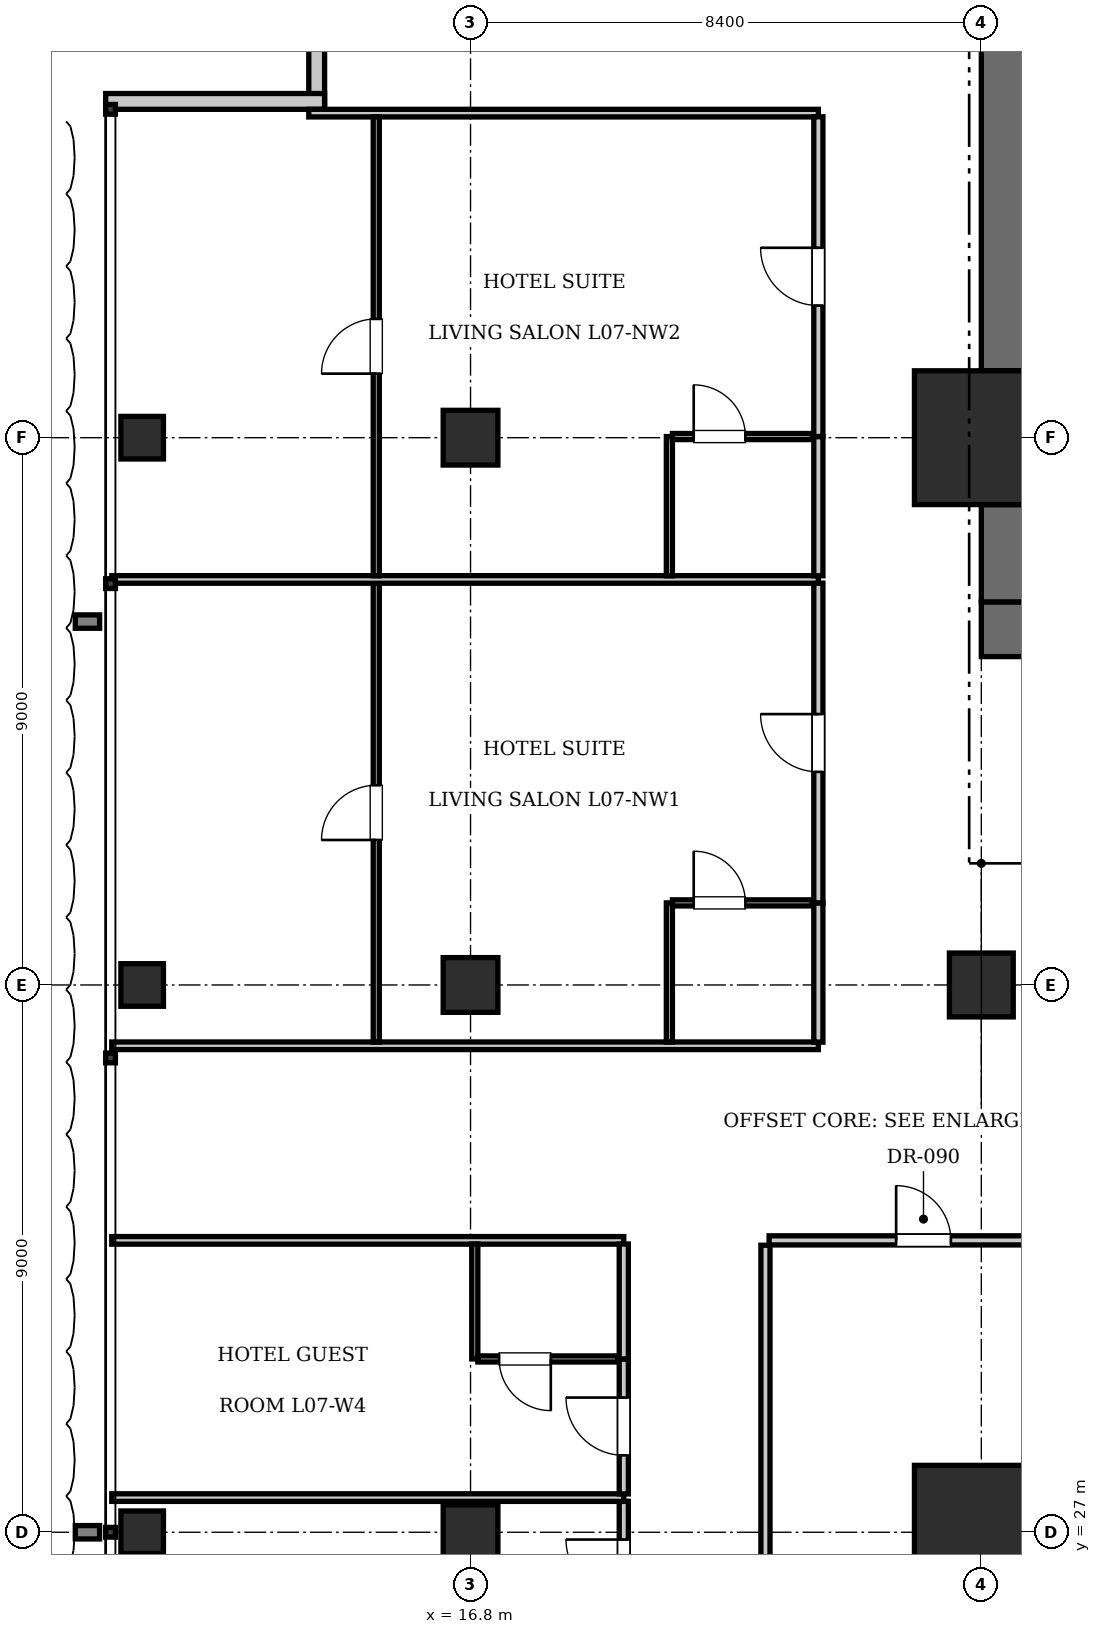
"""IFC4 building model, lengths in metres.
Left out: names, types, materials, properties, quantities, classifications, styles, units other than length and angle.
Written with IfcOpenShell. Run it as: python <this file> out.ifc"""

import sys

from ifc_helpers import new_model, si_unit, direction, frame, frame_2d, origin, origin_2d, place, context, subcontext, project, spatial, rectangle, i_section, extrude, element, fill, save


model = new_model("IFC4")
c1 = context("Model", 3, precision=1e-05, world=origin(), true_north=direction((0.0, 1.0)))
c2 = subcontext(c1, "Body", "Model", "MODEL_VIEW")
j1 = project(units=[si_unit("LENGTHUNIT", "METRE"), si_unit("PLANEANGLEUNIT", "RADIAN")], contexts=[c1])
p1 = place(None, origin())
s1 = spatial("IfcSite", under=j1, at=p1, CompositionType="ELEMENT")
p2 = place(p1, origin())
s2 = spatial("IfcBuilding", under=s1, at=p2, CompositionType="ELEMENT")
p3 = place(p2, frame((0.0, 0.0, 34.65)))
s3 = spatial("IfcBuildingStorey", under=s2, at=p3, CompositionType="ELEMENT", Elevation=34.65)
for number, where, z_axis, x_axis in (
    (1, (25.2, 27.0, 0.0), (0.0, 0.0, 1.0), (1.0, 0.0, 0.0)),
    (2, (25.2, 45.0, 0.0), (0.0, 0.0, 1.0), (1.0, 0.0, 0.0)),
):
    element("IfcColumn", number, at=place(p3, frame(where, z_axis=z_axis, x_axis=x_axis)), inside=s3, PredefinedType="COLUMN", context=c2, shape_type="SweptSolid", body=[
        extrude(rectangle(XDim=2.2, YDim=2.2, at=origin_2d()), origin(), (0.0, 0.0, 1.0), 3.85),
    ])
p4 = place(p3, frame((25.2, 41.85, 0.0), z_axis=(0.0, 0.0, 1.0), x_axis=(1.0, 0.0, 0.0)))
e3 = element("IfcWall", 3, at=p4, inside=s3, PredefinedType="SHEAR", context=c2, shape_type="SweptSolid", body=[
    extrude(rectangle(XDim=6.8, YDim=0.9, at=frame_2d((3.4, 0.0))), origin(), (0.0, 0.0, 1.0), 3.85),
])
p5 = place(p4, frame((1.65, 0.0, 0.0)))
e4 = element("IfcOpeningElement", 4, at=p5, cuts=e3, PredefinedType="OPENING", context=c2, shape_type="SweptSolid", body=[
    extrude(rectangle(XDim=1.15, YDim=2.15, at=frame_2d((0.575, 1.075))), frame((0.0, 0.46, 0.0), z_axis=(0.0, -1.0, 0.0), x_axis=(1.0, 0.0, 0.0)), (0.0, 0.0, 1.0), 0.92),
])
p6 = place(p4, frame((5.15, 0.0, 0.0)))
e5 = element("IfcOpeningElement", 5, at=p6, cuts=e3, PredefinedType="OPENING", context=c2, shape_type="SweptSolid", body=[
    extrude(rectangle(XDim=1.1, YDim=2.2, at=frame_2d((0.55, 1.1))), frame((0.0, 0.46, 0.0), z_axis=(0.0, -1.0, 0.0), x_axis=(1.0, 0.0, 0.0)), (0.0, 0.0, 1.0), 0.92),
])
p7 = place(p3, frame((25.65, 42.3, 0.0), z_axis=(0.0, 0.0, 1.0), x_axis=(0.0, 1.0, 0.0)))
e6 = element("IfcWall", 6, at=p7, inside=s3, PredefinedType="SHEAR", context=c2, shape_type="SweptSolid", body=[
    extrude(rectangle(XDim=1.6, YDim=0.9, at=frame_2d((0.8, 0.0))), origin(), (0.0, 0.0, 1.0), 3.85),
])
p8 = place(p3, frame((25.65, 46.1, 0.0), z_axis=(0.0, 0.0, 1.0), x_axis=(0.0, 1.0, 0.0)))
e7 = element("IfcWall", 7, at=p8, inside=s3, PredefinedType="SHEAR", context=c2, shape_type="SweptSolid", body=[
    extrude(rectangle(XDim=7.0, YDim=0.9, at=frame_2d((3.5, 0.0))), origin(), (0.0, 0.0, 1.0), 3.85),
])
p9 = place(p3, frame((25.2, 36.0, 0.0), z_axis=(0.0, 0.0, 1.0), x_axis=(1.0, 0.0, 0.0)))
e8 = element("IfcColumn", 8, at=p9, inside=s3, PredefinedType="COLUMN", context=c2, shape_type="SweptSolid", body=[
    extrude(rectangle(XDim=1.05, YDim=1.05, at=origin_2d()), origin(), (0.0, 0.0, 1.0), 3.85),
])
for number, where, z_axis, x_axis in (
    (9, (16.8, 27.0, 0.0), (0.0, 0.0, 1.0), (1.0, 0.0, 0.0)),
    (10, (16.8, 36.0, 0.0), (0.0, 0.0, 1.0), (1.0, 0.0, 0.0)),
    (11, (16.8, 45.0, 0.0), (0.0, 0.0, 1.0), (1.0, 0.0, 0.0)),
):
    element("IfcColumn", number, at=place(p3, frame(where, z_axis=z_axis, x_axis=x_axis)), inside=s3, PredefinedType="COLUMN", context=c2, shape_type="SweptSolid", body=[
        extrude(rectangle(XDim=0.9, YDim=0.9, at=origin_2d()), origin(), (0.0, 0.0, 1.0), 3.85),
    ])
for number, where, z_axis, x_axis in (
    (12, (11.4, 27.0, 0.0), (0.0, 0.0, 1.0), (1.0, 0.0, 0.0)),
    (13, (11.4, 36.0, 0.0), (0.0, 0.0, 1.0), (1.0, 0.0, 0.0)),
    (14, (11.4, 45.0, 0.0), (0.0, 0.0, 1.0), (1.0, 0.0, 0.0)),
):
    element("IfcColumn", number, at=place(p3, frame(where, z_axis=z_axis, x_axis=x_axis)), inside=s3, PredefinedType="COLUMN", context=c2, shape_type="SweptSolid", body=[
        extrude(i_section(OverallWidth=0.7, OverallDepth=0.7, WebThickness=0.028, FlangeThickness=0.044, at=origin_2d()), origin(), (0.0, 0.0, 1.0), 3.85),
    ])
p10 = place(p3, frame((14.27, 50.4, 0.0), z_axis=(0.0, 0.0, 1.0), x_axis=(0.0, 1.0, 0.0)))
e15 = element("IfcWall", 15, at=p10, inside=s3, PredefinedType="SOLIDWALL", context=c2, shape_type="SweptSolid", body=[
    extrude(rectangle(XDim=3.6, YDim=0.26, at=frame_2d((1.8, 0.0))), origin(), (0.0, 0.0, 1.0), 3.61),
])
p11 = place(p3, frame((10.8, 50.53, 0.0), z_axis=(0.0, 0.0, 1.0), x_axis=(1.0, 0.0, 0.0)))
e16 = element("IfcWall", 16, at=p11, inside=s3, PredefinedType="SOLIDWALL", context=c2, shape_type="SweptSolid", body=[
    extrude(rectangle(XDim=3.6, YDim=0.26, at=frame_2d((1.8, 0.0))), origin(), (0.0, 0.0, 1.0), 3.61),
])
p12 = place(p3, frame((21.65, 23.48, 0.0), z_axis=(0.0, 0.0, 1.0), x_axis=(0.0, 1.0, 0.0)))
e17 = element("IfcWall", 17, at=p12, inside=s3, PredefinedType="PARTITIONING", context=c2, shape_type="SweptSolid", body=[
    extrude(rectangle(XDim=8.24, YDim=0.15, at=frame_2d((4.12, 0.0))), origin(), (0.0, 0.0, 1.0), 3.61),
])
p13 = place(p3, frame((21.71, 31.8, 0.0), z_axis=(0.0, 0.0, 1.0), x_axis=(1.0, 0.0, 0.0)))
e18 = element("IfcWall", 18, at=p13, inside=s3, PredefinedType="PARTITIONING", context=c2, shape_type="SweptSolid", body=[
    extrude(rectangle(XDim=5.078, YDim=0.15, at=frame_2d((2.539, 0.0))), origin(), (0.0, 0.0, 1.0), 3.61),
])
p14 = place(p13, frame((2.089, 0.0, 0.0)))
e19 = element("IfcOpeningElement", 19, at=p14, cuts=e18, PredefinedType="OPENING", context=c2, shape_type="SweptSolid", body=[
    extrude(rectangle(XDim=0.9, YDim=2.1, at=frame_2d((0.45, 1.05))), frame((0.0, 0.085, 0.0), z_axis=(0.0, -1.0, 0.0), x_axis=(1.0, 0.0, 0.0)), (0.0, 0.0, 1.0), 0.17),
])
p15 = place(p3, frame((10.9, 31.8, 0.0), z_axis=(0.0, 0.0, 1.0), x_axis=(1.0, 0.0, 0.0)))
e20 = element("IfcWall", 20, at=p15, inside=s3, PredefinedType="PARTITIONING", context=c2, shape_type="SweptSolid", body=[
    extrude(rectangle(XDim=8.42, YDim=0.125, at=frame_2d((4.21, 0.0))), origin(), (0.0, 0.0, 1.0), 3.61),
])
p16 = place(p3, frame((19.32, 25.3, 0.0), z_axis=(0.0, 0.0, 1.0), x_axis=(0.0, 1.0, 0.0)))
e21 = element("IfcWall", 21, at=p16, inside=s3, PredefinedType="PARTITIONING", context=c2, shape_type="SweptSolid", body=[
    extrude(rectangle(XDim=2.21, YDim=0.15, at=frame_2d((1.105, 0.0))), origin(), (0.0, 0.0, 1.0), 3.61),
])
p17 = place(p16, frame((0.63, 0.0, 0.0)))
e22 = element("IfcOpeningElement", 22, at=p17, cuts=e21, PredefinedType="OPENING", context=c2, shape_type="SweptSolid", body=[
    extrude(rectangle(XDim=0.95, YDim=2.15, at=frame_2d((0.475, 1.075))), frame((0.0, 0.085, 0.0), z_axis=(0.0, -1.0, 0.0), x_axis=(1.0, 0.0, 0.0)), (0.0, 0.0, 1.0), 0.17),
])
p18 = place(p3, frame((10.9, 27.57, 0.0), z_axis=(0.0, 0.0, 1.0), x_axis=(1.0, 0.0, 0.0)))
e23 = element("IfcWall", 23, at=p18, inside=s3, PredefinedType="PARTITIONING", context=c2, shape_type="SweptSolid", body=[
    extrude(rectangle(XDim=8.42, YDim=0.125, at=frame_2d((4.21, 0.0))), origin(), (0.0, 0.0, 1.0), 3.61),
])
p19 = place(p3, frame((19.32, 27.63, 0.0), z_axis=(0.0, 0.0, 1.0), x_axis=(0.0, 1.0, 0.0)))
e24 = element("IfcWall", 24, at=p19, inside=s3, PredefinedType="PARTITIONING", context=c2, shape_type="SweptSolid", body=[
    extrude(rectangle(XDim=2.22, YDim=0.15, at=frame_2d((1.11, 0.0))), origin(), (0.0, 0.0, 1.0), 3.61),
])
p20 = place(p19, frame((0.635, 0.0, 0.0)))
e25 = element("IfcOpeningElement", 25, at=p20, cuts=e24, PredefinedType="OPENING", context=c2, shape_type="SweptSolid", body=[
    extrude(rectangle(XDim=0.95, YDim=2.15, at=frame_2d((0.475, 1.075))), frame((0.0, 0.085, 0.0), z_axis=(0.0, -1.0, 0.0), x_axis=(1.0, 0.0, 0.0)), (0.0, 0.0, 1.0), 0.17),
])
p21 = place(p3, frame((19.32, 29.85, 0.0), z_axis=(0.0, 0.0, 1.0), x_axis=(0.0, 1.0, 0.0)))
e26 = element("IfcWall", 26, at=p21, inside=s3, PredefinedType="PARTITIONING", context=c2, shape_type="SweptSolid", body=[
    extrude(rectangle(XDim=1.89, YDim=0.15, at=frame_2d((0.945, 0.0))), origin(), (0.0, 0.0, 1.0), 3.61),
])
p22 = place(p3, frame((16.87, 29.85, 0.0), z_axis=(0.0, 0.0, 1.0), x_axis=(0.0, 1.0, 0.0)))
e27 = element("IfcWall", 27, at=p22, inside=s3, PredefinedType="PARTITIONING", context=c2, shape_type="SweptSolid", body=[
    extrude(rectangle(XDim=1.89, YDim=0.1, at=frame_2d((0.945, 0.0))), origin(), (0.0, 0.0, 1.0), 2.988),
])
p23 = place(p3, frame((16.92, 29.85, 0.0), z_axis=(0.0, 0.0, 1.0), x_axis=(1.0, 0.0, 0.0)))
e28 = element("IfcWall", 28, at=p23, inside=s3, PredefinedType="PARTITIONING", context=c2, shape_type="SweptSolid", body=[
    extrude(rectangle(XDim=2.3, YDim=0.1, at=frame_2d((1.15, 0.0))), origin(), (0.0, 0.0, 1.0), 3.61),
])
p24 = place(p23, frame((0.35, 0.0, 0.0)))
e29 = element("IfcOpeningElement", 29, at=p24, cuts=e28, PredefinedType="OPENING", context=c2, shape_type="SweptSolid", body=[
    extrude(rectangle(XDim=0.85, YDim=2.1, at=frame_2d((0.425, 1.05))), frame((0.0, 0.06, 0.0), z_axis=(0.0, -1.0, 0.0), x_axis=(1.0, 0.0, 0.0)), (0.0, 0.0, 1.0), 0.12),
])
p25 = place(p3, frame((10.9, 35.0, 0.0), z_axis=(0.0, 0.0, 1.0), x_axis=(1.0, 0.0, 0.0)))
e30 = element("IfcWall", 30, at=p25, inside=s3, PredefinedType="PARTITIONING", context=c2, shape_type="SweptSolid", body=[
    extrude(rectangle(XDim=11.62, YDim=0.125, at=frame_2d((5.81, 0.0))), origin(), (0.0, 0.0, 1.0), 3.61),
])
p26 = place(p3, frame((14.14, 50.337, 0.0), z_axis=(0.0, 0.0, 1.0), x_axis=(1.0, 0.0, 0.0)))
e31 = element("IfcWall", 31, at=p26, inside=s3, PredefinedType="PARTITIONING", context=c2, shape_type="SweptSolid", body=[
    extrude(rectangle(XDim=8.38, YDim=0.125, at=frame_2d((4.19, 0.0))), origin(), (0.0, 0.0, 1.0), 3.61),
])
p27 = place(p3, frame((22.52, 35.06, 0.0), z_axis=(0.0, 0.0, 1.0), x_axis=(0.0, 1.0, 0.0)))
e32 = element("IfcWall", 32, at=p27, inside=s3, PredefinedType="PARTITIONING", context=c2, shape_type="SweptSolid", body=[
    extrude(rectangle(XDim=2.29, YDim=0.15, at=frame_2d((1.145, 0.0))), origin(), (0.0, 0.0, 1.0), 3.61),
])
p28 = place(p3, frame((22.52, 37.35, 0.0), z_axis=(0.0, 0.0, 1.0), x_axis=(0.0, 1.0, 0.0)))
e33 = element("IfcWall", 33, at=p28, inside=s3, PredefinedType="PARTITIONING", context=c2, shape_type="SweptSolid", body=[
    extrude(rectangle(XDim=5.259, YDim=0.15, at=frame_2d((2.629, 0.0))), origin(), (0.0, 0.0, 1.0), 3.61),
])
p29 = place(p28, frame((2.154, 0.0, 0.0)))
e34 = element("IfcOpeningElement", 34, at=p29, cuts=e33, PredefinedType="OPENING", context=c2, shape_type="SweptSolid", body=[
    extrude(rectangle(XDim=0.95, YDim=2.15, at=frame_2d((0.475, 1.075))), frame((0.0, 0.085, 0.0), z_axis=(0.0, -1.0, 0.0), x_axis=(1.0, 0.0, 0.0)), (0.0, 0.0, 1.0), 0.17),
])
p30 = place(p3, frame((20.07, 35.06, 0.0), z_axis=(0.0, 0.0, 1.0), x_axis=(0.0, 1.0, 0.0)))
e35 = element("IfcWall", 35, at=p30, inside=s3, PredefinedType="PARTITIONING", context=c2, shape_type="SweptSolid", body=[
    extrude(rectangle(XDim=2.29, YDim=0.1, at=frame_2d((1.145, 0.0))), origin(), (0.0, 0.0, 1.0), 3.61),
])
p31 = place(p3, frame((20.12, 37.35, 0.0), z_axis=(0.0, 0.0, 1.0), x_axis=(1.0, 0.0, 0.0)))
e36 = element("IfcWall", 36, at=p31, inside=s3, PredefinedType="PARTITIONING", context=c2, shape_type="SweptSolid", body=[
    extrude(rectangle(XDim=2.3, YDim=0.1, at=frame_2d((1.15, 0.0))), origin(), (0.0, 0.0, 1.0), 3.61),
])
p32 = place(p31, frame((0.35, 0.0, 0.0)))
e37 = element("IfcOpeningElement", 37, at=p32, cuts=e36, PredefinedType="OPENING", context=c2, shape_type="SweptSolid", body=[
    extrude(rectangle(XDim=0.85, YDim=2.1, at=frame_2d((0.425, 1.05))), frame((0.0, 0.06, 0.0), z_axis=(0.0, -1.0, 0.0), x_axis=(1.0, 0.0, 0.0)), (0.0, 0.0, 1.0), 0.12),
])
p33 = place(p3, frame((15.25, 35.06, 0.0), z_axis=(0.0, 0.0, 1.0), x_axis=(0.0, 1.0, 0.0)))
e38 = element("IfcWall", 38, at=p33, inside=s3, PredefinedType="PARTITIONING", context=c2, shape_type="SweptSolid", body=[
    extrude(rectangle(XDim=7.549, YDim=0.1, at=frame_2d((3.774, 0.0))), origin(), (0.0, 0.0, 1.0), 3.61),
])
p34 = place(p33, frame((3.324, 0.0, 0.0)))
e39 = element("IfcOpeningElement", 39, at=p34, cuts=e38, PredefinedType="OPENING", context=c2, shape_type="SweptSolid", body=[
    extrude(rectangle(XDim=0.9, YDim=2.1, at=frame_2d((0.45, 1.05))), frame((0.0, 0.06, 0.0), z_axis=(0.0, -1.0, 0.0), x_axis=(1.0, 0.0, 0.0)), (0.0, 0.0, 1.0), 0.12),
])
p35 = place(p3, frame((10.9, 42.669, 0.0), z_axis=(0.0, 0.0, 1.0), x_axis=(1.0, 0.0, 0.0)))
e40 = element("IfcWall", 40, at=p35, inside=s3, PredefinedType="PARTITIONING", context=c2, shape_type="SweptSolid", body=[
    extrude(rectangle(XDim=11.62, YDim=0.125, at=frame_2d((5.81, 0.0))), origin(), (0.0, 0.0, 1.0), 3.61),
])
p36 = place(p3, frame((22.52, 42.729, 0.0), z_axis=(0.0, 0.0, 1.0), x_axis=(0.0, 1.0, 0.0)))
e41 = element("IfcWall", 41, at=p36, inside=s3, PredefinedType="PARTITIONING", context=c2, shape_type="SweptSolid", body=[
    extrude(rectangle(XDim=2.29, YDim=0.15, at=frame_2d((1.145, 0.0))), origin(), (0.0, 0.0, 1.0), 3.61),
])
p37 = place(p3, frame((22.52, 45.019, 0.0), z_axis=(0.0, 0.0, 1.0), x_axis=(0.0, 1.0, 0.0)))
e42 = element("IfcWall", 42, at=p37, inside=s3, PredefinedType="PARTITIONING", context=c2, shape_type="SweptSolid", body=[
    extrude(rectangle(XDim=5.259, YDim=0.15, at=frame_2d((2.629, 0.0))), origin(), (0.0, 0.0, 1.0), 3.61),
])
p38 = place(p37, frame((2.154, 0.0, 0.0)))
e43 = element("IfcOpeningElement", 43, at=p38, cuts=e42, PredefinedType="OPENING", context=c2, shape_type="SweptSolid", body=[
    extrude(rectangle(XDim=0.95, YDim=2.15, at=frame_2d((0.475, 1.075))), frame((0.0, 0.085, 0.0), z_axis=(0.0, -1.0, 0.0), x_axis=(1.0, 0.0, 0.0)), (0.0, 0.0, 1.0), 0.17),
])
p39 = place(p3, frame((20.07, 42.729, 0.0), z_axis=(0.0, 0.0, 1.0), x_axis=(0.0, 1.0, 0.0)))
e44 = element("IfcWall", 44, at=p39, inside=s3, PredefinedType="PARTITIONING", context=c2, shape_type="SweptSolid", body=[
    extrude(rectangle(XDim=2.29, YDim=0.1, at=frame_2d((1.145, 0.0))), origin(), (0.0, 0.0, 1.0), 3.61),
])
p40 = place(p3, frame((20.12, 45.019, 0.0), z_axis=(0.0, 0.0, 1.0), x_axis=(1.0, 0.0, 0.0)))
e45 = element("IfcWall", 45, at=p40, inside=s3, PredefinedType="PARTITIONING", context=c2, shape_type="SweptSolid", body=[
    extrude(rectangle(XDim=2.3, YDim=0.1, at=frame_2d((1.15, 0.0))), origin(), (0.0, 0.0, 1.0), 2.988),
])
p41 = place(p40, frame((0.35, 0.0, 0.0)))
e46 = element("IfcOpeningElement", 46, at=p41, cuts=e45, PredefinedType="OPENING", context=c2, shape_type="SweptSolid", body=[
    extrude(rectangle(XDim=0.85, YDim=2.1, at=frame_2d((0.425, 1.05))), frame((0.0, 0.06, 0.0), z_axis=(0.0, -1.0, 0.0), x_axis=(1.0, 0.0, 0.0)), (0.0, 0.0, 1.0), 0.12),
])
p42 = place(p3, frame((15.25, 42.729, 0.0), z_axis=(0.0, 0.0, 1.0), x_axis=(0.0, 1.0, 0.0)))
e47 = element("IfcWall", 47, at=p42, inside=s3, PredefinedType="PARTITIONING", context=c2, shape_type="SweptSolid", body=[
    extrude(rectangle(XDim=7.549, YDim=0.1, at=frame_2d((3.774, 0.0))), origin(), (0.0, 0.0, 1.0), 3.61),
])
p43 = place(p42, frame((3.324, 0.0, 0.0)))
e48 = element("IfcOpeningElement", 48, at=p43, cuts=e47, PredefinedType="OPENING", context=c2, shape_type="SweptSolid", body=[
    extrude(rectangle(XDim=0.9, YDim=2.1, at=frame_2d((0.45, 1.05))), frame((0.0, 0.06, 0.0), z_axis=(0.0, -1.0, 0.0), x_axis=(1.0, 0.0, 0.0)), (0.0, 0.0, 1.0), 0.12),
])
p44 = place(p14, origin())
e49 = element("IfcDoor", 49, at=p44, inside=s3, OperationType="SINGLE_SWING_LEFT", PredefinedType="DOOR", context=c2, shape_type="SweptSolid", body=[
    extrude(rectangle(XDim=0.9, YDim=2.1, at=frame_2d((0.45, 1.05))), frame((0.0, 0.025, 0.0), z_axis=(0.0, -1.0, 0.0), x_axis=(1.0, 0.0, 0.0)), (0.0, 0.0, 1.0), 0.05),
])
fill(e19, e49)
p45 = place(p17, origin())
e50 = element("IfcDoor", 50, at=p45, inside=s3, OperationType="SINGLE_SWING_RIGHT", PredefinedType="DOOR", context=c2, shape_type="SweptSolid", body=[
    extrude(rectangle(XDim=0.95, YDim=2.15, at=frame_2d((0.475, 1.075))), frame((0.0, 0.025, 0.0), z_axis=(0.0, -1.0, 0.0), x_axis=(1.0, 0.0, 0.0)), (0.0, 0.0, 1.0), 0.05),
])
fill(e22, e50)
p46 = place(p24, frame((0.85, 0.0, 0.0), z_axis=(0.0, 0.0, 1.0), x_axis=(-1.0, 0.0, 0.0)))
e51 = element("IfcDoor", 51, at=p46, inside=s3, OperationType="SINGLE_SWING_LEFT", PredefinedType="DOOR", context=c2, shape_type="SweptSolid", body=[
    extrude(rectangle(XDim=0.85, YDim=2.1, at=frame_2d((0.425, 1.05))), frame((0.0, 0.025, 0.0), z_axis=(0.0, -1.0, 0.0), x_axis=(1.0, 0.0, 0.0)), (0.0, 0.0, 1.0), 0.05),
])
fill(e29, e51)
p47 = place(p20, origin())
e52 = element("IfcDoor", 52, at=p47, inside=s3, OperationType="SINGLE_SWING_RIGHT", PredefinedType="DOOR", context=c2, shape_type="SweptSolid", body=[
    extrude(rectangle(XDim=0.95, YDim=2.15, at=frame_2d((0.475, 1.075))), frame((0.0, 0.025, 0.0), z_axis=(0.0, -1.0, 0.0), x_axis=(1.0, 0.0, 0.0)), (0.0, 0.0, 1.0), 0.05),
])
fill(e25, e52)
p48 = place(p32, origin())
e53 = element("IfcDoor", 53, at=p48, inside=s3, OperationType="SINGLE_SWING_LEFT", PredefinedType="DOOR", context=c2, shape_type="SweptSolid", body=[
    extrude(rectangle(XDim=0.85, YDim=2.1, at=frame_2d((0.425, 1.05))), frame((0.0, 0.025, 0.0), z_axis=(0.0, -1.0, 0.0), x_axis=(1.0, 0.0, 0.0)), (0.0, 0.0, 1.0), 0.05),
])
fill(e37, e53)
p49 = place(p29, origin())
e54 = element("IfcDoor", 54, at=p49, inside=s3, OperationType="SINGLE_SWING_RIGHT", PredefinedType="DOOR", context=c2, shape_type="SweptSolid", body=[
    extrude(rectangle(XDim=0.95, YDim=2.15, at=frame_2d((0.475, 1.075))), frame((0.0, 0.025, 0.0), z_axis=(0.0, -1.0, 0.0), x_axis=(1.0, 0.0, 0.0)), (0.0, 0.0, 1.0), 0.05),
])
fill(e34, e54)
p50 = place(p34, origin())
e55 = element("IfcDoor", 55, at=p50, inside=s3, OperationType="SINGLE_SWING_LEFT", PredefinedType="DOOR", context=c2, shape_type="SweptSolid", body=[
    extrude(rectangle(XDim=0.9, YDim=2.1, at=frame_2d((0.45, 1.05))), frame((0.0, 0.025, 0.0), z_axis=(0.0, -1.0, 0.0), x_axis=(1.0, 0.0, 0.0)), (0.0, 0.0, 1.0), 0.05),
])
fill(e39, e55)
p51 = place(p41, origin())
e56 = element("IfcDoor", 56, at=p51, inside=s3, OperationType="SINGLE_SWING_LEFT", PredefinedType="DOOR", context=c2, shape_type="SweptSolid", body=[
    extrude(rectangle(XDim=0.85, YDim=2.1, at=frame_2d((0.425, 1.05))), frame((0.0, 0.025, 0.0), z_axis=(0.0, -1.0, 0.0), x_axis=(1.0, 0.0, 0.0)), (0.0, 0.0, 1.0), 0.05),
])
fill(e46, e56)
p52 = place(p38, origin())
e57 = element("IfcDoor", 57, at=p52, inside=s3, OperationType="SINGLE_SWING_RIGHT", PredefinedType="DOOR", context=c2, shape_type="SweptSolid", body=[
    extrude(rectangle(XDim=0.95, YDim=2.15, at=frame_2d((0.475, 1.075))), frame((0.0, 0.025, 0.0), z_axis=(0.0, -1.0, 0.0), x_axis=(1.0, 0.0, 0.0)), (0.0, 0.0, 1.0), 0.05),
])
fill(e43, e57)
p53 = place(p43, origin())
e58 = element("IfcDoor", 58, at=p53, inside=s3, OperationType="SINGLE_SWING_LEFT", PredefinedType="DOOR", context=c2, shape_type="SweptSolid", body=[
    extrude(rectangle(XDim=0.9, YDim=2.1, at=frame_2d((0.45, 1.05))), frame((0.0, 0.025, 0.0), z_axis=(0.0, -1.0, 0.0), x_axis=(1.0, 0.0, 0.0)), (0.0, 0.0, 1.0), 0.05),
])
fill(e48, e58)
save(model, sys.argv[1])
